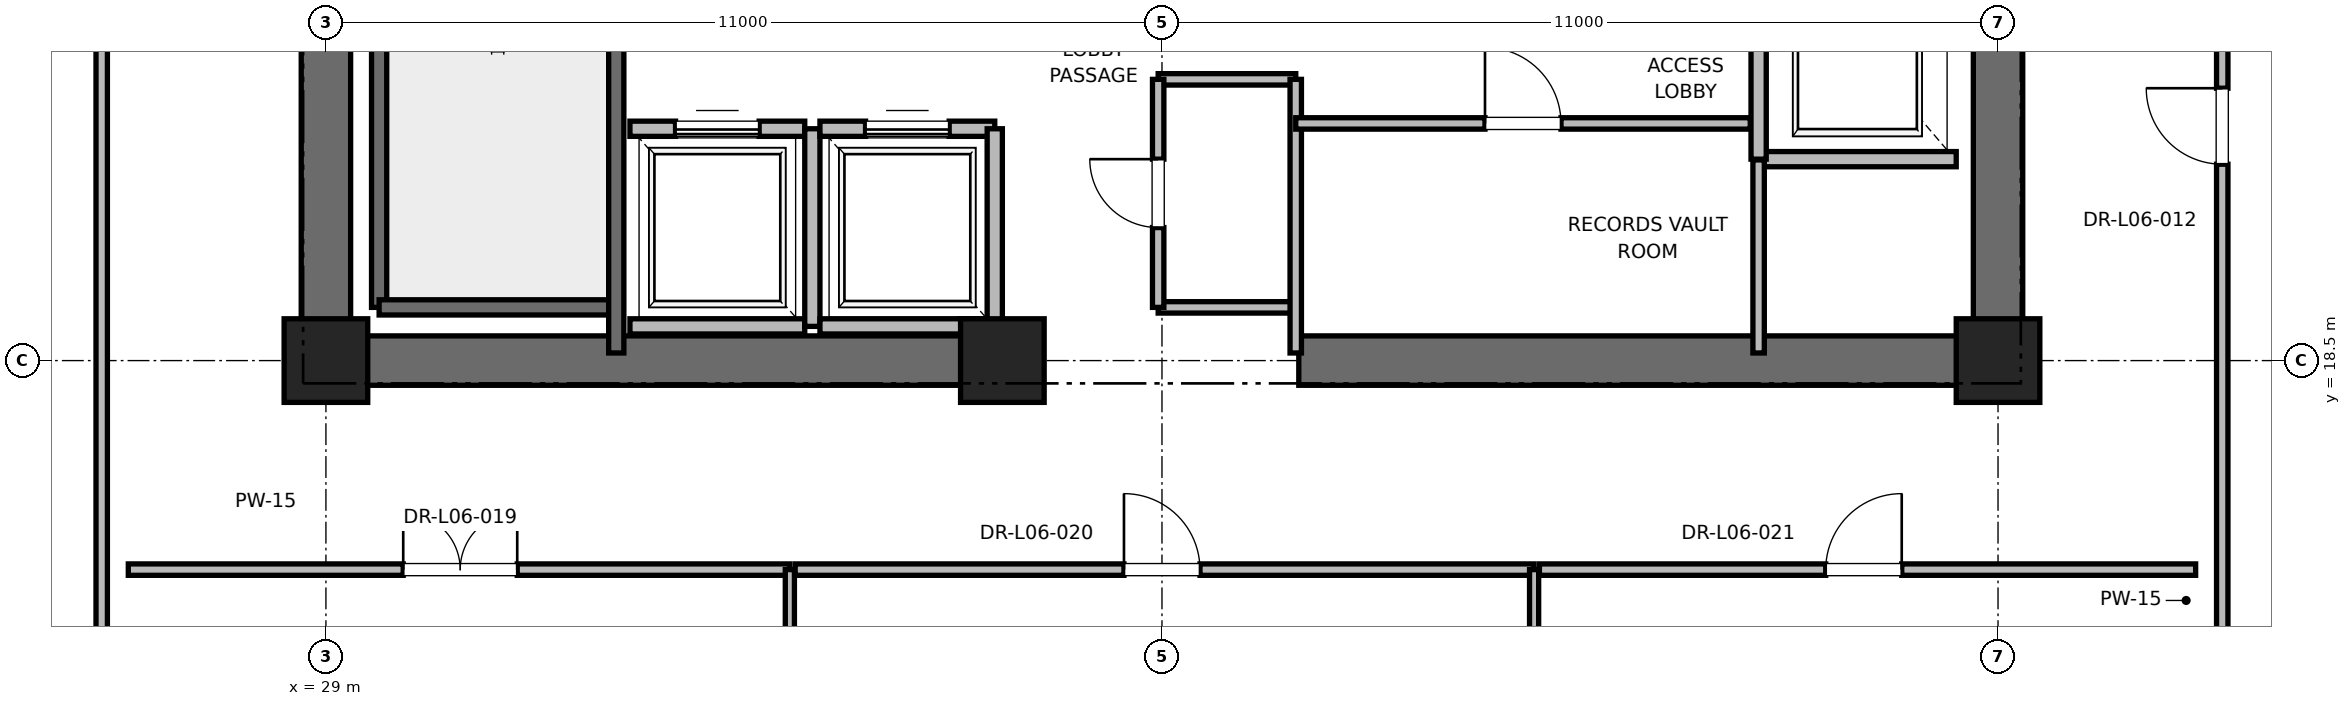
"""IFC4 building model, lengths in metres.
Left out: names, types, materials, properties, quantities, classifications, styles, units other than length and angle.
Written with IfcOpenShell. Run it as: python <this file> out.ifc"""

import sys

from ifc_helpers import new_model, si_unit, direction, frame, frame_2d, origin, origin_2d, place, context, subcontext, project, spatial, rectangle, extrude, element, fill, save


model = new_model("IFC4")
c1 = context("Model", 3, precision=1e-05, world=origin(), true_north=direction((0.0, 1.0)))
c2 = subcontext(c1, "Body", "Model", "MODEL_VIEW")
j1 = project(units=[si_unit("LENGTHUNIT", "METRE"), si_unit("PLANEANGLEUNIT", "RADIAN")], contexts=[c1])
p1 = place(None, origin())
s1 = spatial("IfcSite", under=j1, at=p1, CompositionType="ELEMENT")
p2 = place(p1, origin())
s2 = spatial("IfcBuilding", under=s1, at=p2, CompositionType="ELEMENT")
p3 = place(p2, frame((0.0, 0.0, 31.6)))
s3 = spatial("IfcBuildingStorey", under=s2, at=p3, CompositionType="ELEMENT", Elevation=31.6)
for number, where, z_axis, x_axis in (
    (1, (29.0, 18.5, 0.0), (0.0, 0.0, 1.0), (1.0, 0.0, 0.0)),
    (2, (51.0, 18.5, 0.0), (0.0, 0.0, 1.0), (1.0, 0.0, 0.0)),
    (3, (37.9, 18.5, 0.0), (0.0, 0.0, 1.0), (1.0, 0.0, 0.0)),
):
    element("IfcColumn", number, at=place(p3, frame(where, z_axis=z_axis, x_axis=x_axis)), inside=s3, PredefinedType="PILASTER", context=c2, shape_type="SweptSolid", body=[
        extrude(rectangle(XDim=1.1, YDim=1.1, at=origin_2d()), origin(), (0.0, 0.0, 1.0), 4.0),
    ])
for number, where, z_axis, x_axis in (
    (4, (29.0, 18.5, 0.0), (0.0, 0.0, 1.0), (1.0, 0.0, 0.0)),
    (5, (41.8, 18.5, 0.0), (0.0, 0.0, 1.0), (1.0, 0.0, 0.0)),
):
    element("IfcWall", number, at=place(p3, frame(where, z_axis=z_axis, x_axis=x_axis)), inside=s3, PredefinedType="SHEAR", context=c2, shape_type="SweptSolid", body=[
        extrude(rectangle(XDim=9.2, YDim=0.65, at=frame_2d((4.6, 0.0))), origin(), (0.0, 0.0, 1.0), 3.76),
    ])
p4 = place(p3, frame((29.0, 18.5, 0.0), z_axis=(0.0, 0.0, 1.0), x_axis=(0.0, 1.0, 0.0)))
e6 = element("IfcWall", 6, at=p4, inside=s3, PredefinedType="SHEAR", context=c2, shape_type="SweptSolid", body=[
    extrude(rectangle(XDim=8.8, YDim=0.65, at=frame_2d((4.4, 0.0))), origin(), (0.0, 0.0, 1.0), 3.76),
])
p5 = place(p3, frame((51.0, 18.5, 0.0), z_axis=(0.0, 0.0, 1.0), x_axis=(0.0, 1.0, 0.0)))
e7 = element("IfcWall", 7, at=p5, inside=s3, PredefinedType="SHEAR", context=c2, shape_type="SweptSolid", body=[
    extrude(rectangle(XDim=5.8, YDim=0.65, at=frame_2d((2.9, 0.0))), origin(), (0.0, 0.0, 1.0), 3.76),
])
p6 = place(p3, frame((29.7, 19.2, 0.0), z_axis=(0.0, 0.0, 1.0), x_axis=(0.0, 1.0, 0.0)))
e8 = element("IfcWall", 8, at=p6, inside=s3, PredefinedType="SOLIDWALL", context=c2, shape_type="SweptSolid", body=[
    extrude(rectangle(XDim=8.15, YDim=0.2, at=frame_2d((4.075, 0.0))), origin(), (0.0, 0.0, 1.0), 3.76),
])
p7 = place(p3, frame((29.7, 19.2, 0.0), z_axis=(0.0, 0.0, 1.0), x_axis=(1.0, 0.0, 0.0)))
e9 = element("IfcWall", 9, at=p7, inside=s3, PredefinedType="SOLIDWALL", context=c2, shape_type="SweptSolid", body=[
    extrude(rectangle(XDim=3.12, YDim=0.2, at=frame_2d((1.56, 0.0))), origin(), (0.0, 0.0, 1.0), 3.76),
])
p8 = place(p3, frame((32.82, 18.6, 0.0), z_axis=(0.0, 0.0, 1.0), x_axis=(0.0, 1.0, 0.0)))
e10 = element("IfcWall", 10, at=p8, inside=s3, PredefinedType="SOLIDWALL", context=c2, shape_type="SweptSolid", body=[
    extrude(rectangle(XDim=8.78, YDim=0.2, at=frame_2d((4.39, 0.0))), origin(), (0.0, 0.0, 1.0), 3.76),
])
p9 = place(p3, frame((47.85, 21.15, 0.0), z_axis=(0.0, 0.0, 1.0), x_axis=(1.0, 0.0, 0.0)))
e11 = element("IfcWall", 11, at=p9, inside=s3, PredefinedType="SOLIDWALL", context=c2, shape_type="SweptSolid", body=[
    extrude(rectangle(XDim=2.6, YDim=0.2, at=frame_2d((1.3, 0.0))), origin(), (0.0, 0.0, 1.0), 3.76),
])
p10 = place(p3, frame((47.85, 24.15, 0.0), z_axis=(0.0, 0.0, 1.0), x_axis=(0.0, -1.0, 0.0)))
e12 = element("IfcWall", 12, at=p10, inside=s3, PredefinedType="SOLIDWALL", context=c2, shape_type="SweptSolid", body=[
    extrude(rectangle(XDim=3.0, YDim=0.2, at=frame_2d((1.5, 0.0))), origin(), (0.0, 0.0, 1.0), 3.76),
])
p11 = place(p3, frame((33.0, 18.95, 0.0), z_axis=(0.0, 0.0, 1.0), x_axis=(1.0, 0.0, 0.0)))
e13 = element("IfcWall", 13, at=p11, inside=s3, PredefinedType="SOLIDWALL", context=c2, shape_type="SweptSolid", body=[
    extrude(rectangle(XDim=2.3, YDim=0.2, at=frame_2d((1.15, 0.0))), origin(), (0.0, 0.0, 1.0), 3.76),
])
p12 = place(p3, frame((35.3, 21.55, 0.0), z_axis=(0.0, 0.0, 1.0), x_axis=(-1.0, 0.0, 0.0)))
e14 = element("IfcWall", 14, at=p12, inside=s3, PredefinedType="SOLIDWALL", context=c2, shape_type="SweptSolid", body=[
    extrude(rectangle(XDim=2.3, YDim=0.2, at=frame_2d((1.15, 0.0))), origin(), (0.0, 0.0, 1.0), 3.76),
])
p13 = place(p12, frame((0.6, 0.0, 0.0)))
e15 = element("IfcOpeningElement", 15, at=p13, cuts=e14, PredefinedType="OPENING", context=c2, shape_type="SweptSolid", body=[
    extrude(rectangle(XDim=1.1, YDim=2.2, at=frame_2d((0.55, 1.1))), frame((0.0, 0.1, 0.0), z_axis=(0.0, -1.0, 0.0), x_axis=(1.0, 0.0, 0.0)), (0.0, 0.0, 1.0), 0.2),
])
p14 = place(p3, frame((35.4, 18.95, 0.0), z_axis=(0.0, 0.0, 1.0), x_axis=(0.0, 1.0, 0.0)))
e16 = element("IfcWall", 16, at=p14, inside=s3, PredefinedType="SOLIDWALL", context=c2, shape_type="SweptSolid", body=[
    extrude(rectangle(XDim=2.6, YDim=0.2, at=frame_2d((1.3, 0.0))), origin(), (0.0, 0.0, 1.0), 3.76),
])
p15 = place(p3, frame((35.5, 18.95, 0.0), z_axis=(0.0, 0.0, 1.0), x_axis=(1.0, 0.0, 0.0)))
e17 = element("IfcWall", 17, at=p15, inside=s3, PredefinedType="SOLIDWALL", context=c2, shape_type="SweptSolid", body=[
    extrude(rectangle(XDim=2.3, YDim=0.2, at=frame_2d((1.15, 0.0))), origin(), (0.0, 0.0, 1.0), 2.54),
])
p16 = place(p3, frame((37.8, 21.55, 0.0), z_axis=(0.0, 0.0, 1.0), x_axis=(-1.0, 0.0, 0.0)))
e18 = element("IfcWall", 18, at=p16, inside=s3, PredefinedType="SOLIDWALL", context=c2, shape_type="SweptSolid", body=[
    extrude(rectangle(XDim=2.3, YDim=0.2, at=frame_2d((1.15, 0.0))), origin(), (0.0, 0.0, 1.0), 3.76),
])
p17 = place(p16, frame((0.6, 0.0, 0.0)))
e19 = element("IfcOpeningElement", 19, at=p17, cuts=e18, PredefinedType="OPENING", context=c2, shape_type="SweptSolid", body=[
    extrude(rectangle(XDim=1.1, YDim=2.2, at=frame_2d((0.55, 1.1))), frame((0.0, 0.1, 0.0), z_axis=(0.0, -1.0, 0.0), x_axis=(1.0, 0.0, 0.0)), (0.0, 0.0, 1.0), 0.2),
])
p18 = place(p3, frame((37.8, 18.95, 0.0), z_axis=(0.0, 0.0, 1.0), x_axis=(0.0, 1.0, 0.0)))
e20 = element("IfcWall", 20, at=p18, inside=s3, PredefinedType="SOLIDWALL", context=c2, shape_type="SweptSolid", body=[
    extrude(rectangle(XDim=2.6, YDim=0.2, at=frame_2d((1.3, 0.0))), origin(), (0.0, 0.0, 1.0), 2.54),
])
for number, where, z_axis, x_axis in (
    (21, (39.95, 19.2, 0.0), (0.0, 0.0, 1.0), (1.0, 0.0, 0.0)),
    (22, (39.95, 22.2, 0.0), (0.0, 0.0, 1.0), (1.0, 0.0, 0.0)),
):
    element("IfcWall", number, at=place(p3, frame(where, z_axis=z_axis, x_axis=x_axis)), inside=s3, PredefinedType="PARTITIONING", context=c2, shape_type="SweptSolid", body=[
        extrude(rectangle(XDim=1.81, YDim=0.15, at=frame_2d((0.905, 0.0))), origin(), (0.0, 0.0, 1.0), 2.85),
    ])
p19 = place(p3, frame((41.76, 18.6, 0.0), z_axis=(0.0, 0.0, 1.0), x_axis=(0.0, 1.0, 0.0)))
e23 = element("IfcWall", 23, at=p19, inside=s3, PredefinedType="PARTITIONING", context=c2, shape_type="SweptSolid", body=[
    extrude(rectangle(XDim=3.6, YDim=0.15, at=frame_2d((1.8, 0.0))), origin(), (0.0, 0.0, 1.0), 2.54),
])
p20 = place(p3, frame((39.95, 19.2, 0.0), z_axis=(0.0, 0.0, 1.0), x_axis=(0.0, 1.0, 0.0)))
e24 = element("IfcWall", 24, at=p20, inside=s3, PredefinedType="PARTITIONING", context=c2, shape_type="SweptSolid", body=[
    extrude(rectangle(XDim=3.0, YDim=0.15, at=frame_2d((1.5, 0.0))), origin(), (0.0, 0.0, 1.0), 2.85),
])
p21 = place(p20, frame((1.05, 0.0, 0.0)))
e25 = element("IfcOpeningElement", 25, at=p21, cuts=e24, PredefinedType="OPENING", context=c2, shape_type="SweptSolid", body=[
    extrude(rectangle(XDim=0.9, YDim=2.1, at=frame_2d((0.45, 1.05))), frame((0.0, 0.075, 0.0), z_axis=(0.0, -1.0, 0.0), x_axis=(1.0, 0.0, 0.0)), (0.0, 0.0, 1.0), 0.15),
])
p22 = place(p3, frame((47.85, 18.6, 0.0), z_axis=(0.0, 0.0, 1.0), x_axis=(0.0, 1.0, 0.0)))
e26 = element("IfcWall", 26, at=p22, inside=s3, PredefinedType="PARTITIONING", context=c2, shape_type="SweptSolid", body=[
    extrude(rectangle(XDim=2.54, YDim=0.15, at=frame_2d((1.27, 0.0))), origin(), (0.0, 0.0, 1.0), 2.85),
])
p23 = place(p3, frame((41.76, 21.62, 0.0), z_axis=(0.0, 0.0, 1.0), x_axis=(1.0, 0.0, 0.0)))
e27 = element("IfcWall", 27, at=p23, inside=s3, PredefinedType="PARTITIONING", context=c2, shape_type="SweptSolid", body=[
    extrude(rectangle(XDim=5.98, YDim=0.15, at=frame_2d((2.99, 0.0))), origin(), (0.0, 0.0, 1.0), 2.85),
])
p24 = place(p23, frame((2.49, 0.0, 0.0)))
e28 = element("IfcOpeningElement", 28, at=p24, cuts=e27, PredefinedType="OPENING", context=c2, shape_type="SweptSolid", body=[
    extrude(rectangle(XDim=1.0, YDim=2.15, at=frame_2d((0.5, 1.075))), frame((0.0, 0.075, 0.0), z_axis=(0.0, -1.0, 0.0), x_axis=(1.0, 0.0, 0.0)), (0.0, 0.0, 1.0), 0.15),
])
p25 = place(p3, frame((26.4, 15.75, 0.0), z_axis=(0.0, 0.0, 1.0), x_axis=(1.0, 0.0, 0.0)))
e29 = element("IfcWall", 29, at=p25, inside=s3, PredefinedType="PARTITIONING", context=c2, shape_type="SweptSolid", body=[
    extrude(rectangle(XDim=8.704, YDim=0.15, at=frame_2d((4.352, 0.0))), origin(), (0.0, 0.0, 1.0), 2.85),
])
p26 = place(p25, frame((3.617, 0.0, 0.0)))
e30 = element("IfcOpeningElement", 30, at=p26, cuts=e29, PredefinedType="OPENING", context=c2, shape_type="SweptSolid", body=[
    extrude(rectangle(XDim=1.5, YDim=2.25, at=frame_2d((0.75, 1.125))), frame((0.0, 0.075, 0.0), z_axis=(0.0, -1.0, 0.0), x_axis=(1.0, 0.0, 0.0)), (0.0, 0.0, 1.0), 0.15),
])
p27 = place(p3, frame((35.104, 5.905, 0.0), z_axis=(0.0, 0.0, 1.0), x_axis=(0.0, 1.0, 0.0)))
e31 = element("IfcWall", 31, at=p27, inside=s3, PredefinedType="PARTITIONING", context=c2, shape_type="SweptSolid", body=[
    extrude(rectangle(XDim=9.845, YDim=0.12, at=frame_2d((4.922, 0.0))), origin(), (0.0, 0.0, 1.0), 2.39),
])
p28 = place(p3, frame((35.174, 15.75, 0.0), z_axis=(0.0, 0.0, 1.0), x_axis=(1.0, 0.0, 0.0)))
e32 = element("IfcWall", 32, at=p28, inside=s3, PredefinedType="PARTITIONING", context=c2, shape_type="SweptSolid", body=[
    extrude(rectangle(XDim=9.722, YDim=0.15, at=frame_2d((4.861, 0.0))), origin(), (0.0, 0.0, 1.0), 2.85),
])
p29 = place(p28, frame((4.326, 0.0, 0.0)))
e33 = element("IfcOpeningElement", 33, at=p29, cuts=e32, PredefinedType="OPENING", context=c2, shape_type="SweptSolid", body=[
    extrude(rectangle(XDim=1.0, YDim=2.15, at=frame_2d((0.5, 1.075))), frame((0.0, 0.075, 0.0), z_axis=(0.0, -1.0, 0.0), x_axis=(1.0, 0.0, 0.0)), (0.0, 0.0, 1.0), 0.15),
])
p30 = place(p3, frame((44.896, 5.905, 0.0), z_axis=(0.0, 0.0, 1.0), x_axis=(0.0, 1.0, 0.0)))
e34 = element("IfcWall", 34, at=p30, inside=s3, PredefinedType="PARTITIONING", context=c2, shape_type="SweptSolid", body=[
    extrude(rectangle(XDim=9.845, YDim=0.12, at=frame_2d((4.922, 0.0))), origin(), (0.0, 0.0, 1.0), 2.39),
])
p31 = place(p3, frame((44.966, 15.75, 0.0), z_axis=(0.0, 0.0, 1.0), x_axis=(1.0, 0.0, 0.0)))
e35 = element("IfcWall", 35, at=p31, inside=s3, PredefinedType="PARTITIONING", context=c2, shape_type="SweptSolid", body=[
    extrude(rectangle(XDim=8.634, YDim=0.15, at=frame_2d((4.317, 0.0))), origin(), (0.0, 0.0, 1.0), 2.85),
])
p32 = place(p31, frame((3.767, 0.0, 0.0)))
e36 = element("IfcOpeningElement", 36, at=p32, cuts=e35, PredefinedType="OPENING", context=c2, shape_type="SweptSolid", body=[
    extrude(rectangle(XDim=1.0, YDim=2.15, at=frame_2d((0.5, 1.075))), frame((0.0, 0.075, 0.0), z_axis=(0.0, -1.0, 0.0), x_axis=(1.0, 0.0, 0.0)), (0.0, 0.0, 1.0), 0.15),
])
p33 = place(p3, frame((26.05, 9.605, 0.0), z_axis=(0.0, 0.0, 1.0), x_axis=(0.0, 1.0, 0.0)))
e37 = element("IfcWall", 37, at=p33, inside=s3, PredefinedType="PARTITIONING", context=c2, shape_type="SweptSolid", body=[
    extrude(rectangle(XDim=35.79, YDim=0.15, at=frame_2d((17.895, 0.0))), origin(), (0.0, 0.0, 1.0), 2.85),
])
p34 = place(p33, frame((17.395, 0.0, 0.0)))
e38 = element("IfcOpeningElement", 38, at=p34, cuts=e37, PredefinedType="OPENING", context=c2, shape_type="SweptSolid", body=[
    extrude(rectangle(XDim=1.0, YDim=2.15, at=frame_2d((0.5, 1.075))), frame((0.0, 0.075, 0.0), z_axis=(0.0, -1.0, 0.0), x_axis=(1.0, 0.0, 0.0)), (0.0, 0.0, 1.0), 0.15),
])
p35 = place(p3, frame((53.95, 9.605, 0.0), z_axis=(0.0, 0.0, 1.0), x_axis=(0.0, 1.0, 0.0)))
e39 = element("IfcWall", 39, at=p35, inside=s3, PredefinedType="PARTITIONING", context=c2, shape_type="SweptSolid", body=[
    extrude(rectangle(XDim=15.032, YDim=0.15, at=frame_2d((7.516, 0.0))), origin(), (0.0, 0.0, 1.0), 2.85),
])
p36 = place(p35, frame((11.479, 0.0, 0.0)))
e40 = element("IfcOpeningElement", 40, at=p36, cuts=e39, PredefinedType="OPENING", context=c2, shape_type="SweptSolid", body=[
    extrude(rectangle(XDim=1.0, YDim=2.15, at=frame_2d((0.5, 1.075))), frame((0.0, 0.075, 0.0), z_axis=(0.0, -1.0, 0.0), x_axis=(1.0, 0.0, 0.0)), (0.0, 0.0, 1.0), 0.15),
])
p37 = place(p13, origin())
e41 = element("IfcDoor", 41, at=p37, inside=s3, OperationType="SLIDING_TO_RIGHT", PredefinedType="DOOR", context=c2, shape_type="SweptSolid", body=[
    extrude(rectangle(XDim=1.1, YDim=2.2, at=frame_2d((0.55, 1.1))), frame((0.0, 0.025, 0.0), z_axis=(0.0, -1.0, 0.0), x_axis=(1.0, 0.0, 0.0)), (0.0, 0.0, 1.0), 0.05),
])
fill(e15, e41)
p38 = place(p17, origin())
e42 = element("IfcDoor", 42, at=p38, inside=s3, OperationType="SLIDING_TO_RIGHT", PredefinedType="DOOR", context=c2, shape_type="SweptSolid", body=[
    extrude(rectangle(XDim=1.1, YDim=2.2, at=frame_2d((0.55, 1.1))), frame((0.0, 0.025, 0.0), z_axis=(0.0, -1.0, 0.0), x_axis=(1.0, 0.0, 0.0)), (0.0, 0.0, 1.0), 0.05),
])
fill(e19, e42)
p39 = place(p21, origin())
e43 = element("IfcDoor", 43, at=p39, inside=s3, OperationType="SINGLE_SWING_RIGHT", PredefinedType="DOOR", context=c2, shape_type="SweptSolid", body=[
    extrude(rectangle(XDim=0.9, YDim=2.1, at=frame_2d((0.45, 1.05))), frame((0.0, 0.025, 0.0), z_axis=(0.0, -1.0, 0.0), x_axis=(1.0, 0.0, 0.0)), (0.0, 0.0, 1.0), 0.05),
])
fill(e25, e43)
p40 = place(p24, origin())
e44 = element("IfcDoor", 44, at=p40, inside=s3, OperationType="SINGLE_SWING_LEFT", PredefinedType="DOOR", context=c2, shape_type="SweptSolid", body=[
    extrude(rectangle(XDim=1.0, YDim=2.15, at=frame_2d((0.5, 1.075))), frame((0.0, 0.025, 0.0), z_axis=(0.0, -1.0, 0.0), x_axis=(1.0, 0.0, 0.0)), (0.0, 0.0, 1.0), 0.05),
])
fill(e28, e44)
p41 = place(p26, origin())
e45 = element("IfcDoor", 45, at=p41, inside=s3, OperationType="DOUBLE_DOOR_SINGLE_SWING", PredefinedType="DOOR", context=c2, shape_type="SweptSolid", body=[
    extrude(rectangle(XDim=1.5, YDim=2.25, at=frame_2d((0.75, 1.125))), frame((0.0, 0.025, 0.0), z_axis=(0.0, -1.0, 0.0), x_axis=(1.0, 0.0, 0.0)), (0.0, 0.0, 1.0), 0.05),
])
fill(e30, e45)
p42 = place(p29, origin())
e46 = element("IfcDoor", 46, at=p42, inside=s3, OperationType="SINGLE_SWING_LEFT", PredefinedType="DOOR", context=c2, shape_type="SweptSolid", body=[
    extrude(rectangle(XDim=1.0, YDim=2.15, at=frame_2d((0.5, 1.075))), frame((0.0, 0.025, 0.0), z_axis=(0.0, -1.0, 0.0), x_axis=(1.0, 0.0, 0.0)), (0.0, 0.0, 1.0), 0.05),
])
fill(e33, e46)
p43 = place(p32, origin())
e47 = element("IfcDoor", 47, at=p43, inside=s3, OperationType="SINGLE_SWING_RIGHT", PredefinedType="DOOR", context=c2, shape_type="SweptSolid", body=[
    extrude(rectangle(XDim=1.0, YDim=2.15, at=frame_2d((0.5, 1.075))), frame((0.0, 0.025, 0.0), z_axis=(0.0, -1.0, 0.0), x_axis=(1.0, 0.0, 0.0)), (0.0, 0.0, 1.0), 0.05),
])
fill(e36, e47)
p44 = place(p36, origin())
e48 = element("IfcDoor", 48, at=p44, inside=s3, OperationType="SINGLE_SWING_RIGHT", PredefinedType="DOOR", context=c2, shape_type="SweptSolid", body=[
    extrude(rectangle(XDim=1.0, YDim=2.15, at=frame_2d((0.5, 1.075))), frame((0.0, 0.025, 0.0), z_axis=(0.0, -1.0, 0.0), x_axis=(1.0, 0.0, 0.0)), (0.0, 0.0, 1.0), 0.05),
])
fill(e40, e48)
save(model, sys.argv[1])
